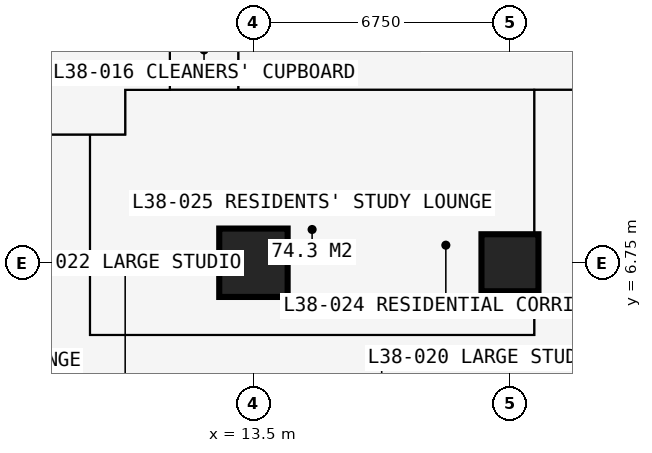
"""IFC4 building model, lengths in metres.
Left out: names, types, materials, properties, quantities, classifications, styles, units other than length and angle.
Written with IfcOpenShell. Run it as: python <this file> out.ifc"""

import sys

from ifc_helpers import new_model, si_unit, direction, frame, frame_2d, origin, origin_2d, place, context, subcontext, project, spatial, rectangle, extrude, element, fill, save


model = new_model("IFC4")
c1 = context("Model", 3, precision=1e-05, world=origin(), true_north=direction((0.0, 1.0)))
c2 = subcontext(c1, "Body", "Model", "MODEL_VIEW")
j1 = project(units=[si_unit("LENGTHUNIT", "METRE"), si_unit("PLANEANGLEUNIT", "RADIAN")], contexts=[c1])
p1 = place(None, origin())
s1 = spatial("IfcSite", under=j1, at=p1, CompositionType="ELEMENT")
p2 = place(p1, origin())
s2 = spatial("IfcBuilding", under=s1, at=p2, CompositionType="ELEMENT")
p3 = place(p2, frame((0.0, 0.0, 142.2)))
s3 = spatial("IfcBuildingStorey", under=s2, at=p3, CompositionType="ELEMENT", Elevation=142.2)
p4 = place(p3, frame((13.5, 6.75, 0.0), z_axis=(0.0, 0.0, 1.0), x_axis=(1.0, 0.0, 0.0)))
e1 = element("IfcColumn", 1, at=p4, inside=s3, PredefinedType="COLUMN", context=c2, shape_type="SweptSolid", body=[
    extrude(rectangle(XDim=1.8, YDim=1.8, at=origin_2d()), origin(), (0.0, 0.0, 1.0), 3.6),
])
p5 = place(p3, frame((20.25, 6.75, 0.0), z_axis=(0.0, 0.0, 1.0), x_axis=(1.0, 0.0, 0.0)))
e2 = element("IfcColumn", 2, at=p5, inside=s3, PredefinedType="COLUMN", context=c2, shape_type="SweptSolid", body=[
    extrude(rectangle(XDim=1.5, YDim=1.5, at=origin_2d()), origin(), (0.0, 0.0, 1.0), 3.6),
])
p6 = place(p3, frame((-0.734, 10.125, 0.0), z_axis=(0.0, 0.0, 1.0), x_axis=(1.0, 0.0, 0.0)))
e3 = element("IfcWall", 3, at=p6, inside=s3, PredefinedType="PARTITIONING", context=c2, shape_type="SweptSolid", body=[
    extrude(rectangle(XDim=10.859, YDim=0.15, at=frame_2d((5.429, 0.0))), origin(), (0.0, 0.0, 1.0), 3.375),
])
p7 = place(p6, frame((8.234, 0.0, 0.0)))
e4 = element("IfcOpeningElement", 4, at=p7, cuts=e3, PredefinedType="OPENING", context=c2, shape_type="SweptSolid", body=[
    extrude(rectangle(XDim=0.95, YDim=2.2, at=frame_2d((0.475, 1.1))), frame((0.0, 0.085, 0.0), z_axis=(0.0, -1.0, 0.0), x_axis=(1.0, 0.0, 0.0)), (0.0, 0.0, 1.0), 0.17),
])
p8 = place(p3, frame((9.2, 4.85, 0.0), z_axis=(0.0, 0.0, 1.0), x_axis=(0.0, 1.0, 0.0)))
e5 = element("IfcWall", 5, at=p8, inside=s3, PredefinedType="PARTITIONING", context=c2, shape_type="SweptSolid", body=[
    extrude(rectangle(XDim=5.275, YDim=0.15, at=frame_2d((2.637, 0.0))), origin(), (0.0, 0.0, 1.0), 3.375),
])
p9 = place(p3, frame((9.2, 4.85, 0.0), z_axis=(0.0, 0.0, 1.0), x_axis=(1.0, 0.0, 0.0)))
e6 = element("IfcWall", 6, at=p9, inside=s3, PredefinedType="PARTITIONING", context=c2, shape_type="SweptSolid", body=[
    extrude(rectangle(XDim=11.688, YDim=0.15, at=frame_2d((5.844, 0.0))), origin(), (0.0, 0.0, 1.0), 3.375),
])
p10 = place(p9, frame((5.35, 0.0, 0.0)))
e7 = element("IfcOpeningElement", 7, at=p10, cuts=e6, PredefinedType="OPENING", context=c2, shape_type="SweptSolid", body=[
    extrude(rectangle(XDim=0.95, YDim=2.2, at=frame_2d((0.475, 1.1))), frame((0.0, 0.085, 0.0), z_axis=(0.0, -1.0, 0.0), x_axis=(1.0, 0.0, 0.0)), (0.0, 0.0, 1.0), 0.17),
])
p11 = place(p3, frame((10.125, 10.125, 0.0), z_axis=(0.0, 0.0, 1.0), x_axis=(0.0, 1.0, 0.0)))
e8 = element("IfcWall", 8, at=p11, inside=s3, PredefinedType="PARTITIONING", context=c2, shape_type="SweptSolid", body=[
    extrude(rectangle(XDim=1.175, YDim=0.15, at=frame_2d((0.587, 0.0))), origin(), (0.0, 0.0, 1.0), 3.375),
])
p12 = place(p3, frame((10.125, 11.3, 0.0), z_axis=(0.0, 0.0, 1.0), x_axis=(1.0, 0.0, 0.0)))
e9 = element("IfcWall", 9, at=p12, inside=s3, PredefinedType="PARTITIONING", context=c2, shape_type="SweptSolid", body=[
    extrude(rectangle(XDim=20.25, YDim=0.15, at=frame_2d((10.125, 0.0))), origin(), (0.0, 0.0, 1.0), 3.375),
])
p13 = place(p12, frame((11.312, 0.0, 0.0)))
e10 = element("IfcOpeningElement", 10, at=p13, cuts=e9, PredefinedType="OPENING", context=c2, shape_type="SweptSolid", body=[
    extrude(rectangle(XDim=1.0, YDim=2.2, at=frame_2d((0.5, 1.1))), frame((0.0, 0.085, 0.0), z_axis=(0.0, -1.0, 0.0), x_axis=(1.0, 0.0, 0.0)), (0.0, 0.0, 1.0), 0.17),
])
p14 = place(p3, frame((11.3, 11.3, 0.0), z_axis=(0.0, 0.0, 1.0), x_axis=(0.0, 1.0, 0.0)))
e11 = element("IfcWall", 11, at=p14, inside=s3, PredefinedType="PARTITIONING", context=c2, shape_type="SweptSolid", body=[
    extrude(rectangle(XDim=19.3, YDim=0.15, at=frame_2d((9.65, 0.0))), origin(), (0.0, 0.0, 1.0), 3.375),
])
p15 = place(p14, frame((18.1, 0.0, 0.0)))
e12 = element("IfcOpeningElement", 12, at=p15, cuts=e11, PredefinedType="OPENING", context=c2, shape_type="SweptSolid", body=[
    extrude(rectangle(XDim=1.0, YDim=2.2, at=frame_2d((0.5, 1.1))), frame((0.0, 0.085, 0.0), z_axis=(0.0, -1.0, 0.0), x_axis=(1.0, 0.0, 0.0)), (0.0, 0.0, 1.0), 0.17),
])
p16 = place(p14, frame((12.137, 0.0, 0.0)))
e13 = element("IfcOpeningElement", 13, at=p16, cuts=e11, PredefinedType="OPENING", context=c2, shape_type="SweptSolid", body=[
    extrude(rectangle(XDim=1.0, YDim=2.2, at=frame_2d((0.5, 1.1))), frame((0.0, 0.085, 0.0), z_axis=(0.0, -1.0, 0.0), x_axis=(1.0, 0.0, 0.0)), (0.0, 0.0, 1.0), 0.17),
])
p17 = place(p3, frame((13.1, 11.3, 0.0), z_axis=(0.0, 0.0, 1.0), x_axis=(0.0, 1.0, 0.0)))
e14 = element("IfcWall", 14, at=p17, inside=s3, PredefinedType="PARTITIONING", context=c2, shape_type="SweptSolid", body=[
    extrude(rectangle(XDim=1.6, YDim=0.15, at=frame_2d((0.8, 0.0))), origin(), (0.0, 0.0, 1.0), 3.375),
])
p18 = place(p3, frame((20.887, 4.85, 0.0), z_axis=(0.0, 0.0, 1.0), x_axis=(0.0, 1.0, 0.0)))
e15 = element("IfcWall", 15, at=p18, inside=s3, PredefinedType="PARTITIONING", context=c2, shape_type="SweptSolid", body=[
    extrude(rectangle(XDim=6.45, YDim=0.15, at=frame_2d((3.225, 0.0))), origin(), (0.0, 0.0, 1.0), 3.375),
])
p19 = place(p13, origin())
e16 = element("IfcDoor", 16, at=p19, inside=s3, OperationType="SINGLE_SWING_LEFT", PredefinedType="DOOR", context=c2, shape_type="SweptSolid", body=[
    extrude(rectangle(XDim=1.0, YDim=2.2, at=frame_2d((0.5, 1.1))), frame((0.0, 0.025, 0.0), z_axis=(0.0, -1.0, 0.0), x_axis=(1.0, 0.0, 0.0)), (0.0, 0.0, 1.0), 0.05),
])
fill(e10, e16)
p20 = place(p10, origin())
e17 = element("IfcDoor", 17, at=p20, inside=s3, OperationType="SINGLE_SWING_LEFT", PredefinedType="DOOR", context=c2, shape_type="SweptSolid", body=[
    extrude(rectangle(XDim=0.95, YDim=2.2, at=frame_2d((0.475, 1.1))), frame((0.0, 0.025, 0.0), z_axis=(0.0, -1.0, 0.0), x_axis=(1.0, 0.0, 0.0)), (0.0, 0.0, 1.0), 0.05),
])
fill(e7, e17)
p21 = place(p7, origin())
e18 = element("IfcDoor", 18, at=p21, inside=s3, OperationType="SINGLE_SWING_LEFT", PredefinedType="DOOR", context=c2, shape_type="SweptSolid", body=[
    extrude(rectangle(XDim=0.95, YDim=2.2, at=frame_2d((0.475, 1.1))), frame((0.0, 0.025, 0.0), z_axis=(0.0, -1.0, 0.0), x_axis=(1.0, 0.0, 0.0)), (0.0, 0.0, 1.0), 0.05),
])
fill(e4, e18)
save(model, sys.argv[1])
